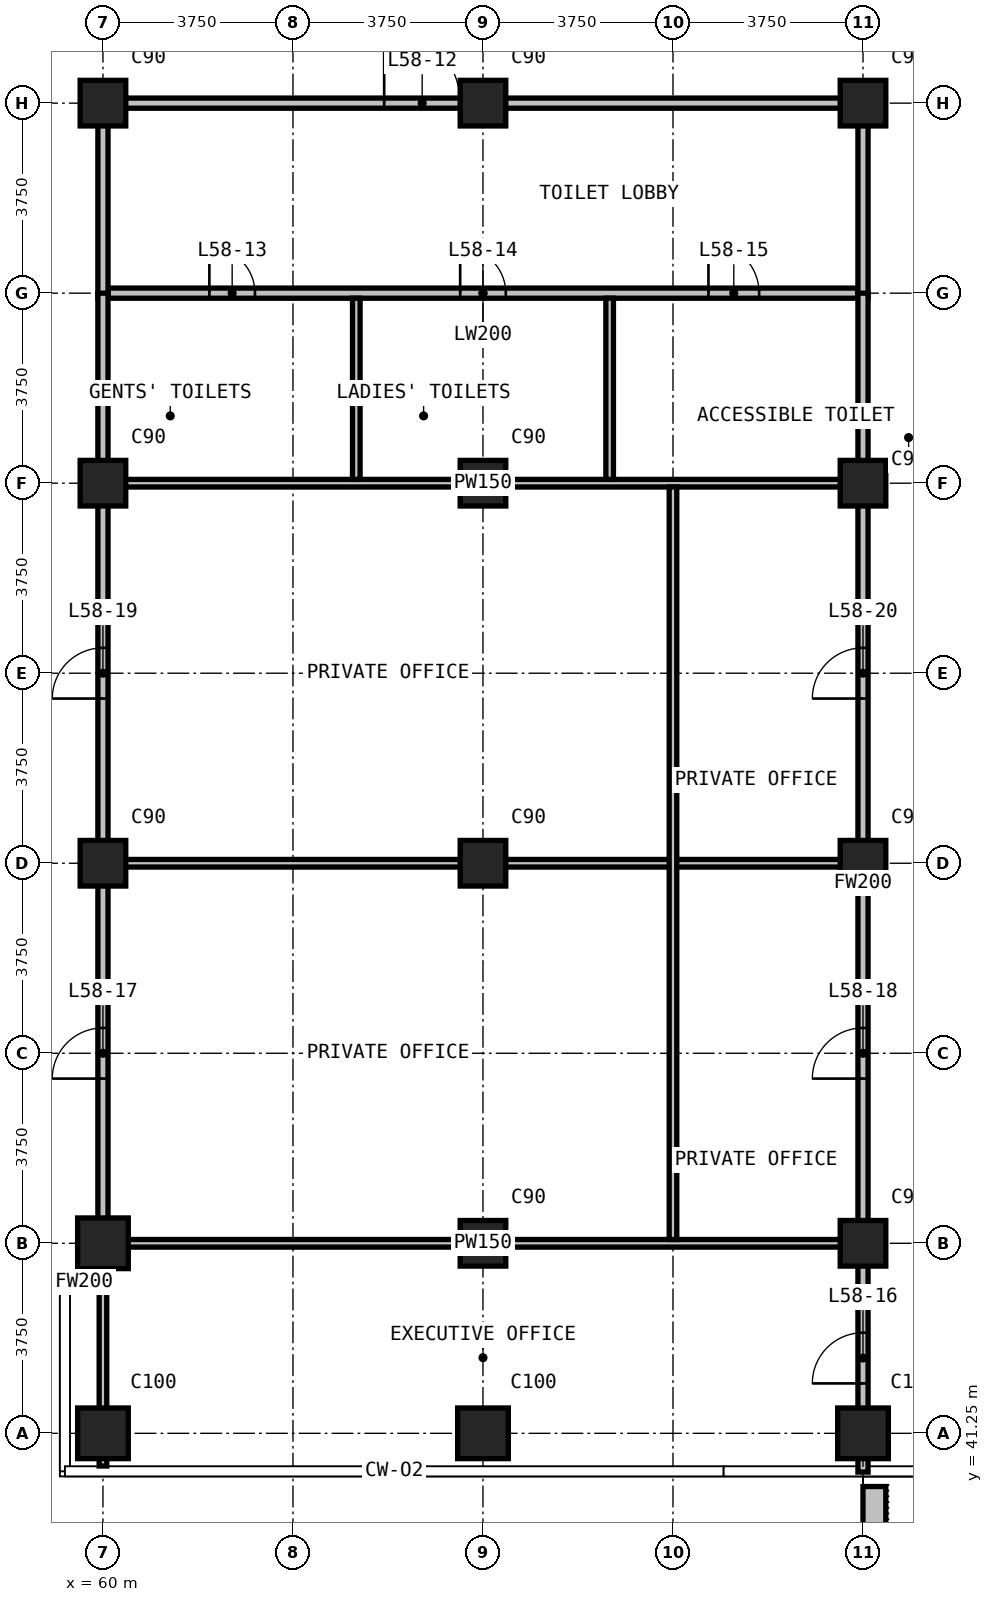
"""IFC4 building model, lengths in metres.
Left out: names, types, materials, properties, quantities, classifications, styles, units other than length and angle.
Written with IfcOpenShell. Run it as: python <this file> out.ifc"""

import sys

from ifc_helpers import new_model, si_unit, direction, frame, frame_2d, origin, origin_2d, place, context, subcontext, project, spatial, rectangle, extrude, element, fill, save


model = new_model("IFC4")
c1 = context("Model", 3, precision=1e-05, world=origin(), true_north=direction((0.0, 1.0)))
c2 = subcontext(c1, "Body", "Model", "MODEL_VIEW")
j1 = project(units=[si_unit("LENGTHUNIT", "METRE"), si_unit("PLANEANGLEUNIT", "RADIAN")], contexts=[c1])
p1 = place(None, origin())
s1 = spatial("IfcSite", under=j1, at=p1, CompositionType="ELEMENT")
p2 = place(p1, origin())
s2 = spatial("IfcBuilding", under=s1, at=p2, CompositionType="ELEMENT")
p3 = place(p2, frame((0.0, 0.0, 224.7)))
s3 = spatial("IfcBuildingStorey", under=s2, at=p3, CompositionType="ELEMENT", Elevation=224.7)
for number, where, z_axis, x_axis in (
    (1, (60.0, 41.25, 0.0), (0.0, 0.0, 1.0), (1.0, 0.0, 0.0)),
    (2, (60.0, 45.0, 0.0), (0.0, 0.0, 1.0), (1.0, 0.0, 0.0)),
):
    element("IfcColumn", number, at=place(p3, frame(where, z_axis=z_axis, x_axis=x_axis)), inside=s3, PredefinedType="COLUMN", context=c2, shape_type="SweptSolid", body=[
        extrude(rectangle(XDim=1.0, YDim=1.0, at=origin_2d()), origin(), (0.0, 0.0, 1.0), 3.6),
    ])
for number, where, z_axis, x_axis in (
    (3, (60.0, 52.5, 0.0), (0.0, 0.0, 1.0), (1.0, 0.0, 0.0)),
    (4, (60.0, 60.0, 0.0), (0.0, 0.0, 1.0), (1.0, 0.0, 0.0)),
    (5, (60.0, 67.5, 0.0), (0.0, 0.0, 1.0), (1.0, 0.0, 0.0)),
):
    element("IfcColumn", number, at=place(p3, frame(where, z_axis=z_axis, x_axis=x_axis)), inside=s3, PredefinedType="COLUMN", context=c2, shape_type="SweptSolid", body=[
        extrude(rectangle(XDim=0.9, YDim=0.9, at=origin_2d()), origin(), (0.0, 0.0, 1.0), 3.6),
    ])
p4 = place(p3, frame((67.5, 41.25, 0.0), z_axis=(0.0, 0.0, 1.0), x_axis=(1.0, 0.0, 0.0)))
e6 = element("IfcColumn", 6, at=p4, inside=s3, PredefinedType="COLUMN", context=c2, shape_type="SweptSolid", body=[
    extrude(rectangle(XDim=1.0, YDim=1.0, at=origin_2d()), origin(), (0.0, 0.0, 1.0), 3.6),
])
for number, where, z_axis, x_axis in (
    (7, (67.5, 45.0, 0.0), (0.0, 0.0, 1.0), (1.0, 0.0, 0.0)),
    (8, (67.5, 52.5, 0.0), (0.0, 0.0, 1.0), (1.0, 0.0, 0.0)),
    (9, (67.5, 60.0, 0.0), (0.0, 0.0, 1.0), (1.0, 0.0, 0.0)),
    (10, (67.5, 67.5, 0.0), (0.0, 0.0, 1.0), (1.0, 0.0, 0.0)),
):
    element("IfcColumn", number, at=place(p3, frame(where, z_axis=z_axis, x_axis=x_axis)), inside=s3, PredefinedType="COLUMN", context=c2, shape_type="SweptSolid", body=[
        extrude(rectangle(XDim=0.9, YDim=0.9, at=origin_2d()), origin(), (0.0, 0.0, 1.0), 3.6),
    ])
p5 = place(p3, frame((75.0, 41.25, 0.0), z_axis=(0.0, 0.0, 1.0), x_axis=(1.0, 0.0, 0.0)))
e11 = element("IfcColumn", 11, at=p5, inside=s3, PredefinedType="COLUMN", context=c2, shape_type="SweptSolid", body=[
    extrude(rectangle(XDim=1.0, YDim=1.0, at=origin_2d()), origin(), (0.0, 0.0, 1.0), 3.6),
])
for number, where, z_axis, x_axis in (
    (12, (75.0, 45.0, 0.0), (0.0, 0.0, 1.0), (1.0, 0.0, 0.0)),
    (13, (75.0, 52.5, 0.0), (0.0, 0.0, 1.0), (1.0, 0.0, 0.0)),
    (14, (75.0, 60.0, 0.0), (0.0, 0.0, 1.0), (1.0, 0.0, 0.0)),
    (15, (75.0, 67.5, 0.0), (0.0, 0.0, 1.0), (1.0, 0.0, 0.0)),
):
    element("IfcColumn", number, at=place(p3, frame(where, z_axis=z_axis, x_axis=x_axis)), inside=s3, PredefinedType="COLUMN", context=c2, shape_type="SweptSolid", body=[
        extrude(rectangle(XDim=0.9, YDim=0.9, at=origin_2d()), origin(), (0.0, 0.0, 1.0), 3.6),
    ])
p6 = place(p3, frame((75.225, 40.2, 0.0), z_axis=(0.0, 0.0, 1.0), x_axis=(0.0, -1.0, 0.0)))
e16 = element("IfcWall", 16, at=p6, inside=s3, PredefinedType="USERDEFINED", context=c2, shape_type="SweptSolid", body=[
    extrude(rectangle(XDim=2.35, YDim=0.45, at=frame_2d((1.175, 0.0))), origin(), (0.0, 0.0, 1.0), 1.1),
])
p7 = place(p3, frame((60.1, 63.75, 0.0), z_axis=(0.0, 0.0, 1.0), x_axis=(1.0, 0.0, 0.0)))
e17 = element("IfcWall", 17, at=p7, inside=s3, PredefinedType="PARTITIONING", context=c2, shape_type="SweptSolid", body=[
    extrude(rectangle(XDim=14.8, YDim=0.2, at=frame_2d((7.4, 0.0))), origin(), (0.0, 0.0, 1.0), 3.3),
])
p8 = place(p7, frame((2.0, 0.0, 0.0)))
e18 = element("IfcOpeningElement", 18, at=p8, cuts=e17, PredefinedType="OPENING", context=c2, shape_type="SweptSolid", body=[
    extrude(rectangle(XDim=0.9, YDim=2.2, at=frame_2d((0.45, 1.1))), frame((0.0, 0.11, 0.0), z_axis=(0.0, -1.0, 0.0), x_axis=(1.0, 0.0, 0.0)), (0.0, 0.0, 1.0), 0.22),
])
p9 = place(p7, frame((6.95, 0.0, 0.0)))
e19 = element("IfcOpeningElement", 19, at=p9, cuts=e17, PredefinedType="OPENING", context=c2, shape_type="SweptSolid", body=[
    extrude(rectangle(XDim=0.9, YDim=2.2, at=frame_2d((0.45, 1.1))), frame((0.0, 0.11, 0.0), z_axis=(0.0, -1.0, 0.0), x_axis=(1.0, 0.0, 0.0)), (0.0, 0.0, 1.0), 0.22),
])
p10 = place(p7, frame((11.85, 0.0, 0.0)))
e20 = element("IfcOpeningElement", 20, at=p10, cuts=e17, PredefinedType="OPENING", context=c2, shape_type="SweptSolid", body=[
    extrude(rectangle(XDim=1.0, YDim=2.2, at=frame_2d((0.5, 1.1))), frame((0.0, 0.11, 0.0), z_axis=(0.0, -1.0, 0.0), x_axis=(1.0, 0.0, 0.0)), (0.0, 0.0, 1.0), 0.22),
])
p11 = place(p3, frame((60.1, 67.5, 0.0), z_axis=(0.0, 0.0, 1.0), x_axis=(1.0, 0.0, 0.0)))
e21 = element("IfcWall", 21, at=p11, inside=s3, PredefinedType="PARTITIONING", context=c2, shape_type="SweptSolid", body=[
    extrude(rectangle(XDim=14.8, YDim=0.2, at=frame_2d((7.4, 0.0))), origin(), (0.0, 0.0, 1.0), 3.3),
])
p12 = place(p11, frame((5.45, 0.0, 0.0)))
e22 = element("IfcOpeningElement", 22, at=p12, cuts=e21, PredefinedType="OPENING", context=c2, shape_type="SweptSolid", body=[
    extrude(rectangle(XDim=1.5, YDim=2.2, at=frame_2d((0.75, 1.1))), frame((0.0, 0.11, 0.0), z_axis=(0.0, -1.0, 0.0), x_axis=(1.0, 0.0, 0.0)), (0.0, 0.0, 1.0), 0.22),
])
for number, where, z_axis, x_axis in (
    (23, (60.0, 63.65, 0.0), (0.0, 0.0, 1.0), (0.0, 1.0, 0.0)),
    (24, (75.0, 63.65, 0.0), (0.0, 0.0, 1.0), (0.0, 1.0, 0.0)),
):
    element("IfcWall", number, at=place(p3, frame(where, z_axis=z_axis, x_axis=x_axis)), inside=s3, PredefinedType="PARTITIONING", context=c2, shape_type="SweptSolid", body=[
        extrude(rectangle(XDim=3.95, YDim=0.2, at=frame_2d((1.975, 0.0))), origin(), (0.0, 0.0, 1.0), 3.3),
    ])
p13 = place(p3, frame((59.355, 44.235, 0.0), z_axis=(0.0, 0.0, 1.0), x_axis=(1.0, 0.0, 0.0)))
e25 = element("IfcWall", 25, at=p13, inside=s3, PredefinedType="PARTITIONING", context=c2, shape_type="SweptSolid", body=[
    extrude(rectangle(XDim=0.545, YDim=0.2, at=frame_2d((0.272, 0.0))), origin(), (0.0, 0.0, 1.0), 3.3),
])
p14 = place(p3, frame((60.0, 44.135, 0.0), z_axis=(0.0, 0.0, 1.0), x_axis=(0.0, 1.0, 0.0)))
e26 = element("IfcWall", 26, at=p14, inside=s3, PredefinedType="PARTITIONING", context=c2, shape_type="SweptSolid", body=[
    extrude(rectangle(XDim=19.615, YDim=0.2, at=frame_2d((9.808, 0.0))), origin(), (0.0, 0.0, 1.0), 3.3),
])
p15 = place(p14, frame((4.115, 0.0, 0.0)))
e27 = element("IfcOpeningElement", 27, at=p15, cuts=e26, PredefinedType="OPENING", context=c2, shape_type="SweptSolid", body=[
    extrude(rectangle(XDim=1.0, YDim=2.2, at=frame_2d((0.5, 1.1))), frame((0.0, 0.11, 0.0), z_axis=(0.0, -1.0, 0.0), x_axis=(1.0, 0.0, 0.0)), (0.0, 0.0, 1.0), 0.22),
])
p16 = place(p14, frame((11.615, 0.0, 0.0)))
e28 = element("IfcOpeningElement", 28, at=p16, cuts=e26, PredefinedType="OPENING", context=c2, shape_type="SweptSolid", body=[
    extrude(rectangle(XDim=1.0, YDim=2.2, at=frame_2d((0.5, 1.1))), frame((0.0, 0.11, 0.0), z_axis=(0.0, -1.0, 0.0), x_axis=(1.0, 0.0, 0.0)), (0.0, 0.0, 1.0), 0.22),
])
p17 = place(p3, frame((75.0, 40.485, 0.0), z_axis=(0.0, 0.0, 1.0), x_axis=(0.0, 1.0, 0.0)))
e29 = element("IfcWall", 29, at=p17, inside=s3, PredefinedType="PARTITIONING", context=c2, shape_type="SweptSolid", body=[
    extrude(rectangle(XDim=23.265, YDim=0.2, at=frame_2d((11.632, 0.0))), origin(), (0.0, 0.0, 1.0), 3.3),
])
p18 = place(p17, frame((1.75, 0.0, 0.0)))
e30 = element("IfcOpeningElement", 30, at=p18, cuts=e29, PredefinedType="OPENING", context=c2, shape_type="SweptSolid", body=[
    extrude(rectangle(XDim=1.0, YDim=2.2, at=frame_2d((0.5, 1.1))), frame((0.0, 0.11, 0.0), z_axis=(0.0, -1.0, 0.0), x_axis=(1.0, 0.0, 0.0)), (0.0, 0.0, 1.0), 0.22),
])
p19 = place(p17, frame((7.765, 0.0, 0.0)))
e31 = element("IfcOpeningElement", 31, at=p19, cuts=e29, PredefinedType="OPENING", context=c2, shape_type="SweptSolid", body=[
    extrude(rectangle(XDim=1.0, YDim=2.2, at=frame_2d((0.5, 1.1))), frame((0.0, 0.11, 0.0), z_axis=(0.0, -1.0, 0.0), x_axis=(1.0, 0.0, 0.0)), (0.0, 0.0, 1.0), 0.22),
])
p20 = place(p17, frame((15.265, 0.0, 0.0)))
e32 = element("IfcOpeningElement", 32, at=p20, cuts=e29, PredefinedType="OPENING", context=c2, shape_type="SweptSolid", body=[
    extrude(rectangle(XDim=1.0, YDim=2.2, at=frame_2d((0.5, 1.1))), frame((0.0, 0.11, 0.0), z_axis=(0.0, -1.0, 0.0), x_axis=(1.0, 0.0, 0.0)), (0.0, 0.0, 1.0), 0.22),
])
for number, where, z_axis, x_axis in (
    (33, (60.1, 45.0, 0.0), (0.0, 0.0, 1.0), (1.0, 0.0, 0.0)),
    (34, (60.1, 52.5, 0.0), (0.0, 0.0, 1.0), (1.0, 0.0, 0.0)),
    (35, (60.1, 60.0, 0.0), (0.0, 0.0, 1.0), (1.0, 0.0, 0.0)),
):
    element("IfcWall", number, at=place(p3, frame(where, z_axis=z_axis, x_axis=x_axis)), inside=s3, PredefinedType="PARTITIONING", context=c2, shape_type="SweptSolid", body=[
        extrude(rectangle(XDim=14.8, YDim=0.15, at=frame_2d((7.4, 0.0))), origin(), (0.0, 0.0, 1.0), 3.3),
    ])
p21 = place(p3, frame((60.0, 40.605, 0.0), z_axis=(0.0, 0.0, 1.0), x_axis=(0.0, 1.0, 0.0)))
e36 = element("IfcWall", 36, at=p21, inside=s3, PredefinedType="PARTITIONING", context=c2, shape_type="SweptSolid", body=[
    extrude(rectangle(XDim=3.6, YDim=0.15, at=frame_2d((1.8, 0.0))), origin(), (0.0, 0.0, 1.0), 3.3),
])
for number, where, z_axis, x_axis in (
    (37, (65.0, 60.075, 0.0), (0.0, 0.0, 1.0), (0.0, 1.0, 0.0)),
    (38, (70.0, 60.075, 0.0), (0.0, 0.0, 1.0), (0.0, 1.0, 0.0)),
):
    element("IfcWall", number, at=place(p3, frame(where, z_axis=z_axis, x_axis=x_axis)), inside=s3, PredefinedType="PARTITIONING", context=c2, shape_type="SweptSolid", body=[
        extrude(rectangle(XDim=3.575, YDim=0.15, at=frame_2d((1.788, 0.0))), origin(), (0.0, 0.0, 1.0), 3.3),
    ])
p22 = place(p3, frame((71.25, 45.075, 0.0), z_axis=(0.0, 0.0, 1.0), x_axis=(0.0, 1.0, 0.0)))
e39 = element("IfcWall", 39, at=p22, inside=s3, PredefinedType="PARTITIONING", context=c2, shape_type="SweptSolid", body=[
    extrude(rectangle(XDim=14.85, YDim=0.15, at=frame_2d((7.425, 0.0))), origin(), (0.0, 0.0, 1.0), 3.3),
])
p23 = place(p12, origin())
e40 = element("IfcDoor", 40, at=p23, inside=s3, OperationType="DOUBLE_DOOR_SINGLE_SWING", PredefinedType="DOOR", context=c2, shape_type="SweptSolid", body=[
    extrude(rectangle(XDim=1.5, YDim=2.2, at=frame_2d((0.75, 1.1))), frame((0.0, 0.025, 0.0), z_axis=(0.0, -1.0, 0.0), x_axis=(1.0, 0.0, 0.0)), (0.0, 0.0, 1.0), 0.05),
])
fill(e22, e40)
p24 = place(p8, origin())
e41 = element("IfcDoor", 41, at=p24, inside=s3, OperationType="SINGLE_SWING_LEFT", PredefinedType="DOOR", context=c2, shape_type="SweptSolid", body=[
    extrude(rectangle(XDim=0.9, YDim=2.2, at=frame_2d((0.45, 1.1))), frame((0.0, 0.025, 0.0), z_axis=(0.0, -1.0, 0.0), x_axis=(1.0, 0.0, 0.0)), (0.0, 0.0, 1.0), 0.05),
])
fill(e18, e41)
p25 = place(p9, origin())
e42 = element("IfcDoor", 42, at=p25, inside=s3, OperationType="SINGLE_SWING_LEFT", PredefinedType="DOOR", context=c2, shape_type="SweptSolid", body=[
    extrude(rectangle(XDim=0.9, YDim=2.2, at=frame_2d((0.45, 1.1))), frame((0.0, 0.025, 0.0), z_axis=(0.0, -1.0, 0.0), x_axis=(1.0, 0.0, 0.0)), (0.0, 0.0, 1.0), 0.05),
])
fill(e19, e42)
p26 = place(p10, origin())
e43 = element("IfcDoor", 43, at=p26, inside=s3, OperationType="SINGLE_SWING_LEFT", PredefinedType="DOOR", context=c2, shape_type="SweptSolid", body=[
    extrude(rectangle(XDim=1.0, YDim=2.2, at=frame_2d((0.5, 1.1))), frame((0.0, 0.025, 0.0), z_axis=(0.0, -1.0, 0.0), x_axis=(1.0, 0.0, 0.0)), (0.0, 0.0, 1.0), 0.05),
])
fill(e20, e43)
p27 = place(p18, origin())
e44 = element("IfcDoor", 44, at=p27, inside=s3, OperationType="SINGLE_SWING_LEFT", PredefinedType="DOOR", context=c2, shape_type="SweptSolid", body=[
    extrude(rectangle(XDim=1.0, YDim=2.2, at=frame_2d((0.5, 1.1))), frame((0.0, 0.025, 0.0), z_axis=(0.0, -1.0, 0.0), x_axis=(1.0, 0.0, 0.0)), (0.0, 0.0, 1.0), 0.05),
])
fill(e30, e44)
p28 = place(p15, origin())
e45 = element("IfcDoor", 45, at=p28, inside=s3, OperationType="SINGLE_SWING_LEFT", PredefinedType="DOOR", context=c2, shape_type="SweptSolid", body=[
    extrude(rectangle(XDim=1.0, YDim=2.2, at=frame_2d((0.5, 1.1))), frame((0.0, 0.025, 0.0), z_axis=(0.0, -1.0, 0.0), x_axis=(1.0, 0.0, 0.0)), (0.0, 0.0, 1.0), 0.05),
])
fill(e27, e45)
p29 = place(p19, origin())
e46 = element("IfcDoor", 46, at=p29, inside=s3, OperationType="SINGLE_SWING_LEFT", PredefinedType="DOOR", context=c2, shape_type="SweptSolid", body=[
    extrude(rectangle(XDim=1.0, YDim=2.2, at=frame_2d((0.5, 1.1))), frame((0.0, 0.025, 0.0), z_axis=(0.0, -1.0, 0.0), x_axis=(1.0, 0.0, 0.0)), (0.0, 0.0, 1.0), 0.05),
])
fill(e31, e46)
p30 = place(p16, origin())
e47 = element("IfcDoor", 47, at=p30, inside=s3, OperationType="SINGLE_SWING_LEFT", PredefinedType="DOOR", context=c2, shape_type="SweptSolid", body=[
    extrude(rectangle(XDim=1.0, YDim=2.2, at=frame_2d((0.5, 1.1))), frame((0.0, 0.025, 0.0), z_axis=(0.0, -1.0, 0.0), x_axis=(1.0, 0.0, 0.0)), (0.0, 0.0, 1.0), 0.05),
])
fill(e28, e47)
p31 = place(p20, origin())
e48 = element("IfcDoor", 48, at=p31, inside=s3, OperationType="SINGLE_SWING_LEFT", PredefinedType="DOOR", context=c2, shape_type="SweptSolid", body=[
    extrude(rectangle(XDim=1.0, YDim=2.2, at=frame_2d((0.5, 1.1))), frame((0.0, 0.025, 0.0), z_axis=(0.0, -1.0, 0.0), x_axis=(1.0, 0.0, 0.0)), (0.0, 0.0, 1.0), 0.05),
])
fill(e32, e48)
save(model, sys.argv[1])
